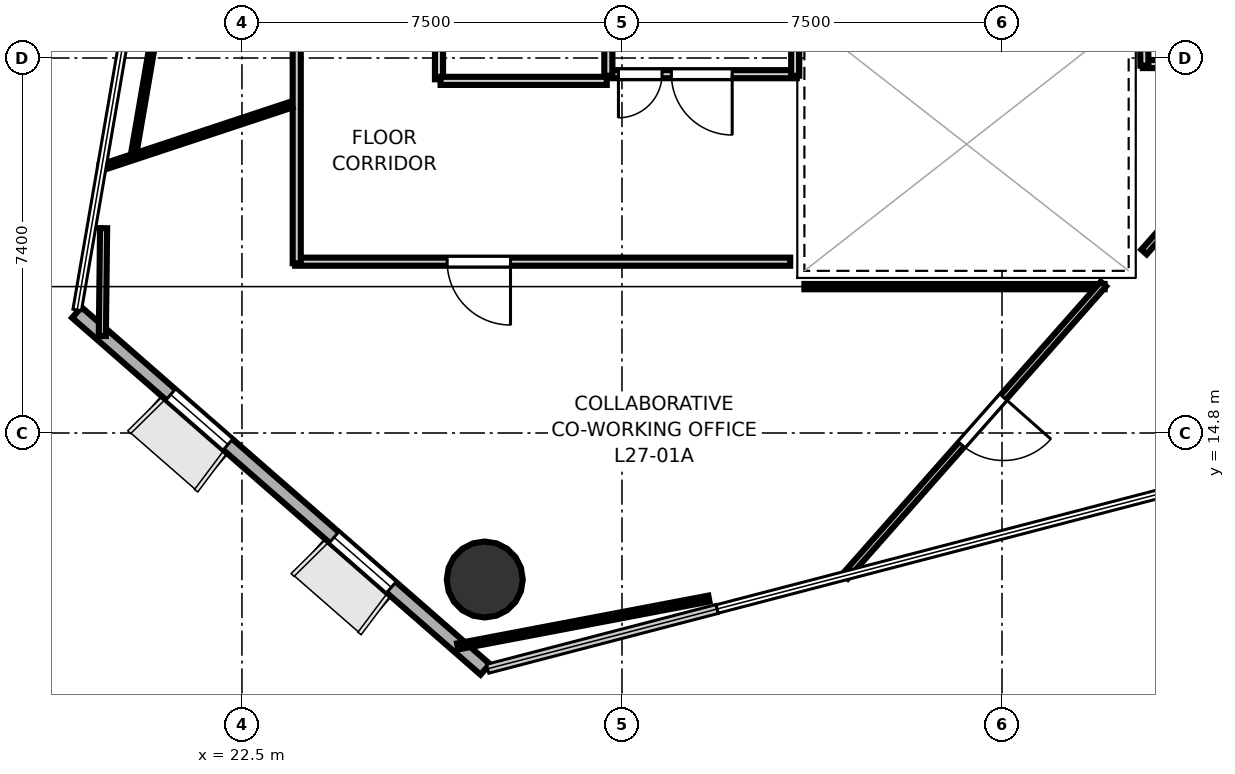
"""IFC4 building model, lengths in metres.
Left out: names, types, materials, properties, quantities, classifications, styles, units other than length and angle.
Written with IfcOpenShell. Run it as: python <this file> out.ifc"""

import sys

from ifc_helpers import new_model, si_unit, direction, frame, frame_2d, origin, origin_2d, place, context, subcontext, project, spatial, rectangle, hollow_circle, extrude, element, fill, save


model = new_model("IFC4")
c1 = context("Model", 3, precision=1e-05, world=origin(), true_north=direction((0.0, 1.0)))
c2 = subcontext(c1, "Body", "Model", "MODEL_VIEW")
j1 = project(units=[si_unit("LENGTHUNIT", "METRE"), si_unit("PLANEANGLEUNIT", "RADIAN")], contexts=[c1])
p1 = place(None, origin())
s1 = spatial("IfcSite", under=j1, at=p1, CompositionType="ELEMENT")
p2 = place(p1, origin())
s2 = spatial("IfcBuilding", under=s1, at=p2, CompositionType="ELEMENT")
p3 = place(p2, frame((0.0, 0.0, 108.9)))
s3 = spatial("IfcBuildingStorey", under=s2, at=p3, CompositionType="ELEMENT", Elevation=108.9)
p4 = place(p3, frame((27.292, 11.909, 0.0), z_axis=(0.0, 0.0, 1.0), x_axis=(1.0, 0.0, 0.0)))
e1 = element("IfcColumn", 1, at=p4, inside=s3, PredefinedType="COLUMN", context=c2, shape_type="SweptSolid", body=[
    extrude(hollow_circle(Radius=0.75, WallThickness=0.036, at=origin_2d()), origin(), (0.0, 0.0, 1.0), 3.7),
])
p5 = place(p3, frame((19.24, 17.179, 0.0), z_axis=(0.0, 0.0, 1.0), x_axis=(0.753037088213, -0.657978072413, 0.0)))
e2 = element("IfcWall", 2, at=p5, inside=s3, PredefinedType="SOLIDWALL", context=c2, shape_type="SweptSolid", body=[
    extrude(rectangle(XDim=10.705, YDim=0.28, at=frame_2d((5.352, 0.0))), origin(), (0.0, 0.0, 1.0), 3.52),
])
p6 = place(p5, frame((2.461, 0.0, 0.85)))
e3 = element("IfcOpeningElement", 3, at=p6, cuts=e2, PredefinedType="OPENING", context=c2, shape_type="SweptSolid", body=[
    extrude(rectangle(XDim=1.5, YDim=2.1, at=frame_2d((0.75, 1.05))), frame((0.0, 0.15, 0.0), z_axis=(0.0, -1.0, 0.0), x_axis=(1.0, 0.0, 0.0)), (0.0, 0.0, 1.0), 0.3),
])
p7 = place(p5, frame((6.743, 0.0, 0.85)))
e4 = element("IfcOpeningElement", 4, at=p7, cuts=e2, PredefinedType="OPENING", context=c2, shape_type="SweptSolid", body=[
    extrude(rectangle(XDim=1.5, YDim=2.1, at=frame_2d((0.75, 1.05))), frame((0.0, 0.15, 0.0), z_axis=(0.0, -1.0, 0.0), x_axis=(1.0, 0.0, 0.0)), (0.0, 0.0, 1.0), 0.3),
])
p8 = place(p3, frame((33.45, 21.881, 0.0), z_axis=(0.0, 0.0, 1.0), x_axis=(-1.0, 0.0, 0.0)))
e5 = element("IfcWall", 5, at=p8, inside=s3, PredefinedType="PARTITIONING", context=c2, shape_type="SweptSolid", body=[
    extrude(rectangle(XDim=3.75, YDim=0.16, at=frame_2d((1.875, 0.0))), origin(), (0.0, 0.0, 1.0), 2.84),
])
p9 = place(p8, frame((1.275, 0.0, 0.0)))
e6 = element("IfcOpeningElement", 6, at=p9, cuts=e5, PredefinedType="OPENING", context=c2, shape_type="SweptSolid", body=[
    extrude(rectangle(XDim=1.2, YDim=2.15, at=frame_2d((0.6, 1.075))), frame((0.0, 0.09, 0.0), z_axis=(0.0, -1.0, 0.0), x_axis=(1.0, 0.0, 0.0)), (0.0, 0.0, 1.0), 0.18),
])
p10 = place(p8, frame((2.66, 0.0, 0.0)))
e7 = element("IfcOpeningElement", 7, at=p10, cuts=e5, PredefinedType="OPENING", context=c2, shape_type="SweptSolid", body=[
    extrude(rectangle(XDim=0.86, YDim=2.05, at=frame_2d((0.43, 1.025))), frame((0.0, 0.09, 0.0), z_axis=(0.0, -1.0, 0.0), x_axis=(1.0, 0.0, 0.0)), (0.0, 0.0, 1.0), 0.18),
])
for number, where, z_axis, x_axis in (
    (8, (29.731, 21.85, 0.0), (0.0, 0.0, 1.0), (0.0, 1.0, 0.0)),
    (9, (33.419, 24.442, 0.0), (0.0, 0.0, 1.0), (0.0, -1.0, 0.0)),
):
    element("IfcWall", number, at=place(p3, frame(where, z_axis=z_axis, x_axis=x_axis)), inside=s3, PredefinedType="PARTITIONING", context=c2, shape_type="SweptSolid", body=[
        extrude(rectangle(XDim=2.592, YDim=0.16, at=frame_2d((1.296, 0.0))), origin(), (0.0, 0.0, 1.0), 2.84),
    ])
p11 = place(p3, frame((41.36, 22.081, 0.0), z_axis=(0.0, 0.0, 1.0), x_axis=(-1.0, 0.0, 0.0)))
e10 = element("IfcWall", 10, at=p11, inside=s3, PredefinedType="PARTITIONING", context=c2, shape_type="SweptSolid", body=[
    extrude(rectangle(XDim=1.08, YDim=0.16, at=frame_2d((0.54, 0.0))), origin(), (0.0, 0.0, 1.0), 2.84),
])
p12 = place(p3, frame((40.311, 22.05, 0.0), z_axis=(0.0, 0.0, 1.0), x_axis=(-0.011836292006, 0.999929948642, 0.0)))
e11 = element("IfcWall", 11, at=p12, inside=s3, PredefinedType="PARTITIONING", context=c2, shape_type="SweptSolid", body=[
    extrude(rectangle(XDim=1.031, YDim=0.16, at=frame_2d((0.516, 0.0))), origin(), (0.0, 0.0, 1.0), 2.84),
])
p13 = place(p3, frame((26.389, 24.531, 0.0), z_axis=(0.0, 0.0, 1.0), x_axis=(0.0, -1.0, 0.0)))
e12 = element("IfcWall", 12, at=p13, inside=s3, PredefinedType="PARTITIONING", context=c2, shape_type="SweptSolid", body=[
    extrude(rectangle(XDim=2.75, YDim=0.16, at=frame_2d((1.375, 0.0))), origin(), (0.0, 0.0, 1.0), 2.84),
])
p14 = place(p3, frame((26.42, 21.749, 0.0), z_axis=(0.0, 0.0, 1.0), x_axis=(1.0, 0.0, 0.0)))
e13 = element("IfcWall", 13, at=p14, inside=s3, PredefinedType="PARTITIONING", context=c2, shape_type="SweptSolid", body=[
    extrude(rectangle(XDim=3.28, YDim=0.16, at=frame_2d((1.64, 0.0))), origin(), (0.0, 0.0, 1.0), 2.84),
])
p15 = place(p3, frame((33.32, 18.181, 0.0), z_axis=(0.0, 0.0, 1.0), x_axis=(-1.0, 0.0, 0.0)))
e14 = element("IfcWall", 14, at=p15, inside=s3, PredefinedType="PARTITIONING", context=c2, shape_type="SweptSolid", body=[
    extrude(rectangle(XDim=9.77, YDim=0.16, at=frame_2d((4.885, 0.0))), origin(), (0.0, 0.0, 1.0), 2.84),
])
p16 = place(p15, frame((5.52, 0.0, 0.0)))
e15 = element("IfcOpeningElement", 15, at=p16, cuts=e14, PredefinedType="OPENING", context=c2, shape_type="SweptSolid", body=[
    extrude(rectangle(XDim=1.25, YDim=2.2, at=frame_2d((0.625, 1.1))), frame((0.0, 0.09, 0.0), z_axis=(0.0, -1.0, 0.0), x_axis=(1.0, 0.0, 0.0)), (0.0, 0.0, 1.0), 0.18),
])
p17 = place(p3, frame((23.581, 18.15, 0.0), z_axis=(0.0, 0.0, 1.0), x_axis=(0.0, 1.0, 0.0)))
e16 = element("IfcWall", 16, at=p17, inside=s3, PredefinedType="PARTITIONING", context=c2, shape_type="SweptSolid", body=[
    extrude(rectangle(XDim=8.575, YDim=0.16, at=frame_2d((4.288, 0.0))), origin(), (0.0, 0.0, 1.0), 2.84),
])
p18 = place(p3, frame((33.6, 17.689, 0.0), z_axis=(0.0, 0.0, 1.0), x_axis=(1.0, 0.0, 0.0)))
e17 = element("IfcWall", 17, at=p18, inside=s3, PredefinedType="PARTITIONING", context=c2, shape_type="SweptSolid", body=[
    extrude(rectangle(XDim=5.925, YDim=0.105, at=frame_2d((2.962, 0.0))), origin(), (0.0, 0.0, 1.0), 2.84),
])
p19 = place(p3, frame((39.502, 17.74, 0.0), z_axis=(0.0, 0.0, 1.0), x_axis=(-0.662230930848, -0.749299802635, 0.0)))
e18 = element("IfcWall", 18, at=p19, inside=s3, PredefinedType="PARTITIONING", context=c2, shape_type="SweptSolid", body=[
    extrude(rectangle(XDim=7.697, YDim=0.14, at=frame_2d((3.849, 0.0))), origin(), (0.0, 0.0, 1.0), 2.84),
])
p20 = place(p19, frame((2.98, 0.0, 0.0)))
e19 = element("IfcOpeningElement", 19, at=p20, cuts=e18, PredefinedType="OPENING", context=c2, shape_type="SweptSolid", body=[
    extrude(rectangle(XDim=1.25, YDim=2.2, at=frame_2d((0.625, 1.1))), frame((0.0, 0.08, 0.0), z_axis=(0.0, -1.0, 0.0), x_axis=(1.0, 0.0, 0.0)), (0.0, 0.0, 1.0), 0.16),
])
p21 = place(p3, frame((31.715, 11.532, 0.0), z_axis=(0.0, 0.0, 1.0), x_axis=(-0.982370304225, -0.186945407476, 0.0)))
e20 = element("IfcWall", 20, at=p21, inside=s3, PredefinedType="PARTITIONING", context=c2, shape_type="SweptSolid", body=[
    extrude(rectangle(XDim=5.047, YDim=0.12, at=frame_2d((2.524, 0.0))), origin(), (0.0, 0.0, 1.0), 2.84),
])
p22 = place(p3, frame((19.745, 16.715, 0.0), z_axis=(0.0, 0.0, 1.0), x_axis=(0.011705843153, 0.999931484271, 0.0)))
e21 = element("IfcWall", 21, at=p22, inside=s3, PredefinedType="PARTITIONING", context=c2, shape_type="SweptSolid", body=[
    extrude(rectangle(XDim=2.127, YDim=0.14, at=frame_2d((1.064, 0.0))), origin(), (0.0, 0.0, 1.0), 2.84),
])
p23 = place(p3, frame((19.713, 20.034, 0.0), z_axis=(0.0, 0.0, 1.0), x_axis=(0.949321292103, 0.314307308793, 0.0)))
e22 = element("IfcWall", 22, at=p23, inside=s3, PredefinedType="PARTITIONING", context=c2, shape_type="SweptSolid", body=[
    extrude(rectangle(XDim=3.968, YDim=0.12, at=frame_2d((1.984, 0.0))), origin(), (0.0, 0.0, 1.0), 2.84),
])
p24 = place(p3, frame((40.303, 18.372, 0.0), z_axis=(0.0, 0.0, 1.0), x_axis=(0.662221894186, 0.749307789136, 0.0)))
e23 = element("IfcWall", 23, at=p24, inside=s3, PredefinedType="PARTITIONING", context=c2, shape_type="SweptSolid", body=[
    extrude(rectangle(XDim=4.895, YDim=0.14, at=frame_2d((2.447, 0.0))), origin(), (0.0, 0.0, 1.0), 2.84),
])
p25 = place(p3, frame((20.371, 20.358, 0.0), z_axis=(0.0, 0.0, 1.0), x_axis=(0.169525939527, 0.985525725604, 0.0)))
e24 = element("IfcWall", 24, at=p25, inside=s3, PredefinedType="PARTITIONING", context=c2, shape_type="SweptSolid", body=[
    extrude(rectangle(XDim=15.044, YDim=0.105, at=frame_2d((7.522, 0.0))), origin(), (0.0, 0.0, 1.0), 2.84),
])
p26 = place(p9, origin())
e25 = element("IfcDoor", 25, at=p26, inside=s3, OperationType="SINGLE_SWING_LEFT", PredefinedType="DOOR", context=c2, shape_type="SweptSolid", body=[
    extrude(rectangle(XDim=1.2, YDim=2.15, at=frame_2d((0.6, 1.075))), frame((0.0, 0.025, 0.0), z_axis=(0.0, -1.0, 0.0), x_axis=(1.0, 0.0, 0.0)), (0.0, 0.0, 1.0), 0.05),
])
fill(e6, e25)
p27 = place(p10, origin())
e26 = element("IfcDoor", 26, at=p27, inside=s3, OperationType="SINGLE_SWING_RIGHT", PredefinedType="DOOR", context=c2, shape_type="SweptSolid", body=[
    extrude(rectangle(XDim=0.86, YDim=2.05, at=frame_2d((0.43, 1.025))), frame((0.0, 0.025, 0.0), z_axis=(0.0, -1.0, 0.0), x_axis=(1.0, 0.0, 0.0)), (0.0, 0.0, 1.0), 0.05),
])
fill(e7, e26)
p28 = place(p16, origin())
e27 = element("IfcDoor", 27, at=p28, inside=s3, OperationType="SINGLE_SWING_LEFT", PredefinedType="DOOR", context=c2, shape_type="SweptSolid", body=[
    extrude(rectangle(XDim=1.25, YDim=2.2, at=frame_2d((0.625, 1.1))), frame((0.0, 0.025, 0.0), z_axis=(0.0, -1.0, 0.0), x_axis=(1.0, 0.0, 0.0)), (0.0, 0.0, 1.0), 0.05),
])
fill(e15, e27)
p29 = place(p20, origin())
e28 = element("IfcDoor", 28, at=p29, inside=s3, OperationType="SINGLE_SWING_LEFT", PredefinedType="DOOR", context=c2, shape_type="SweptSolid", body=[
    extrude(rectangle(XDim=1.25, YDim=2.2, at=frame_2d((0.625, 1.1))), frame((0.0, 0.025, 0.0), z_axis=(0.0, -1.0, 0.0), x_axis=(1.0, 0.0, 0.0)), (0.0, 0.0, 1.0), 0.05),
])
fill(e19, e28)
p30 = place(p6, origin())
e29 = element("IfcWindow", 29, at=p30, inside=s3, PartitioningType="SINGLE_PANEL", PredefinedType="WINDOW", context=c2, shape_type="SweptSolid", body=[
    extrude(rectangle(XDim=1.5, YDim=2.1, at=frame_2d((0.75, 1.05))), frame((0.0, 0.03, 0.0), z_axis=(0.0, -1.0, 0.0), x_axis=(1.0, 0.0, 0.0)), (0.0, 0.0, 1.0), 0.06),
])
fill(e3, e29)
p31 = place(p7, origin())
e30 = element("IfcWindow", 30, at=p31, inside=s3, PartitioningType="SINGLE_PANEL", PredefinedType="WINDOW", context=c2, shape_type="SweptSolid", body=[
    extrude(rectangle(XDim=1.5, YDim=2.1, at=frame_2d((0.75, 1.05))), frame((0.0, 0.03, 0.0), z_axis=(0.0, -1.0, 0.0), x_axis=(1.0, 0.0, 0.0)), (0.0, 0.0, 1.0), 0.06),
])
fill(e4, e30)
save(model, sys.argv[1])
